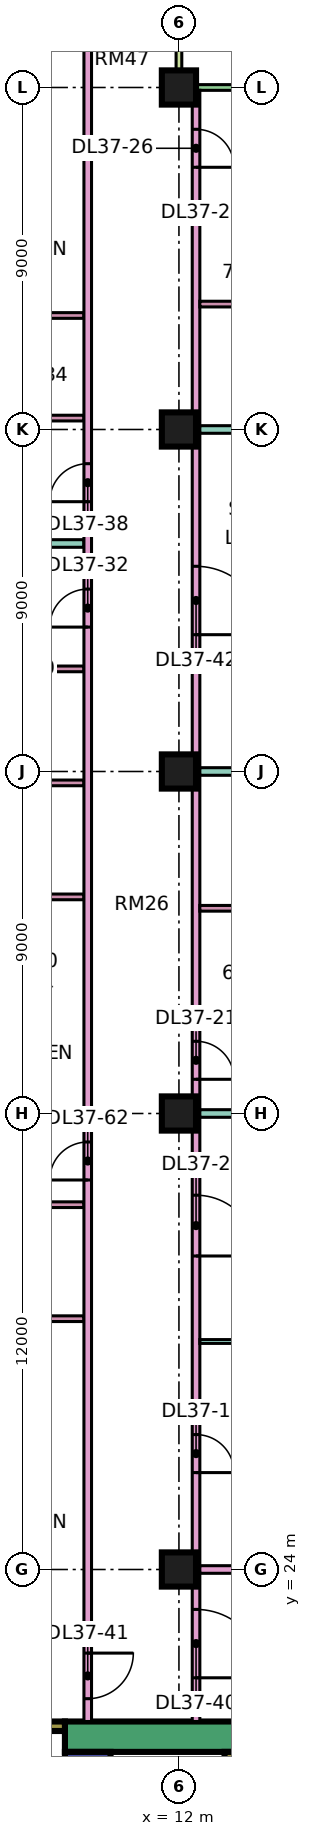
"""IFC4 building model, lengths in metres.
Left out: names, types, materials, properties, quantities, classifications, styles, units other than length and angle.
Written with IfcOpenShell. Run it as: python <this file> out.ifc"""

import sys

from ifc_helpers import new_model, si_unit, direction, frame, frame_2d, origin, origin_2d, place, context, subcontext, project, spatial, rectangle, extrude, element, fill, save


model = new_model("IFC4")
c1 = context("Model", 3, precision=1e-05, world=origin(), true_north=direction((0.0, 1.0)))
c2 = subcontext(c1, "Body", "Model", "MODEL_VIEW")
j1 = project(units=[si_unit("LENGTHUNIT", "METRE"), si_unit("PLANEANGLEUNIT", "RADIAN")], contexts=[c1])
p1 = place(None, origin())
s1 = spatial("IfcSite", under=j1, at=p1, CompositionType="ELEMENT")
p2 = place(p1, origin())
s2 = spatial("IfcBuilding", under=s1, at=p2, CompositionType="ELEMENT")
p3 = place(p2, frame((0.0, 0.0, 164.9)))
s3 = spatial("IfcBuildingStorey", under=s2, at=p3, CompositionType="ELEMENT", Elevation=164.9)
for number, where, z_axis, x_axis in (
    (1, (12.0, 24.0, 0.0), (0.0, 0.0, 1.0), (1.0, 0.0, 0.0)),
    (2, (12.0, 36.0, 0.0), (0.0, 0.0, 1.0), (1.0, 0.0, 0.0)),
    (3, (12.0, 45.0, 0.0), (0.0, 0.0, 1.0), (1.0, 0.0, 0.0)),
    (4, (12.0, 54.0, 0.0), (0.0, 0.0, 1.0), (1.0, 0.0, 0.0)),
    (5, (12.0, 63.0, 0.0), (0.0, 0.0, 1.0), (1.0, 0.0, 0.0)),
):
    element("IfcColumn", number, at=place(p3, frame(where, z_axis=z_axis, x_axis=x_axis)), inside=s3, PredefinedType="COLUMN", context=c2, shape_type="SweptSolid", body=[
        extrude(rectangle(XDim=0.9, YDim=0.9, at=origin_2d()), origin(), (0.0, 0.0, 1.0), 3.75),
    ])
p4 = place(p3, frame((9.0, 19.6, 0.0), z_axis=(0.0, 0.0, 1.0), x_axis=(1.0, 0.0, 0.0)))
e6 = element("IfcWall", 6, at=p4, inside=s3, PredefinedType="SHEAR", context=c2, shape_type="SweptSolid", body=[
    extrude(rectangle(XDim=25.0, YDim=0.8, at=frame_2d((12.5, 0.0))), origin(), (0.0, 0.0, 1.0), 3.75),
])
p5 = place(p4, frame((19.1, 0.0, 0.0)))
e7 = element("IfcOpeningElement", 7, at=p5, cuts=e6, PredefinedType="OPENING", context=c2, shape_type="SweptSolid", body=[
    extrude(rectangle(XDim=1.8, YDim=2.4, at=frame_2d((0.9, 1.2))), frame((0.0, 0.41, 0.0), z_axis=(0.0, -1.0, 0.0), x_axis=(1.0, 0.0, 0.0)), (0.0, 0.0, 1.0), 0.82),
])
p6 = place(p3, frame((9.6, 7.8, 0.0), z_axis=(0.0, 0.0, 1.0), x_axis=(0.0, 1.0, 0.0)))
e8 = element("IfcWall", 8, at=p6, inside=s3, PredefinedType="SHEAR", context=c2, shape_type="SweptSolid", body=[
    extrude(rectangle(XDim=11.4, YDim=1.2, at=frame_2d((5.7, 0.0))), origin(), (0.0, 0.0, 1.0), 3.75),
])
p7 = place(p6, frame((4.075, 0.0, 0.0)))
e9 = element("IfcOpeningElement", 9, at=p7, cuts=e8, PredefinedType="OPENING", context=c2, shape_type="SweptSolid", body=[
    extrude(rectangle(XDim=1.1, YDim=2.2, at=frame_2d((0.55, 1.1))), frame((0.0, 0.61, 0.0), z_axis=(0.0, -1.0, 0.0), x_axis=(1.0, 0.0, 0.0)), (0.0, 0.0, 1.0), 1.22),
])
p8 = place(p6, frame((6.575, 0.0, 0.0)))
e10 = element("IfcOpeningElement", 10, at=p8, cuts=e8, PredefinedType="OPENING", context=c2, shape_type="SweptSolid", body=[
    extrude(rectangle(XDim=1.1, YDim=2.2, at=frame_2d((0.55, 1.1))), frame((0.0, 0.61, 0.0), z_axis=(0.0, -1.0, 0.0), x_axis=(1.0, 0.0, 0.0)), (0.0, 0.0, 1.0), 1.22),
])
p9 = place(p6, frame((9.4, 0.0, 0.0)))
e11 = element("IfcOpeningElement", 11, at=p9, cuts=e8, PredefinedType="OPENING", context=c2, shape_type="SweptSolid", body=[
    extrude(rectangle(XDim=1.1, YDim=2.2, at=frame_2d((0.55, 1.1))), frame((0.0, 0.61, 0.0), z_axis=(0.0, -1.0, 0.0), x_axis=(1.0, 0.0, 0.0)), (0.0, 0.0, 1.0), 1.22),
])
p10 = place(p6, frame((1.75, 0.0, 0.0)))
e12 = element("IfcOpeningElement", 12, at=p10, cuts=e8, PredefinedType="OPENING", context=c2, shape_type="SweptSolid", body=[
    extrude(rectangle(XDim=0.9, YDim=2.1, at=frame_2d((0.45, 1.05))), frame((0.0, 0.61, 0.0), z_axis=(0.0, -1.0, 0.0), x_axis=(1.0, 0.0, 0.0)), (0.0, 0.0, 1.0), 1.22),
])
p11 = place(p3, frame((13.325, 7.8, 0.0), z_axis=(0.0, 0.0, 1.0), x_axis=(0.0, 1.0, 0.0)))
e13 = element("IfcWall", 13, at=p11, inside=s3, PredefinedType="SHEAR", context=c2, shape_type="SweptSolid", body=[
    extrude(rectangle(XDim=11.4, YDim=0.25, at=frame_2d((5.7, 0.0))), origin(), (0.0, 0.0, 1.0), 3.75),
])
p12 = place(p3, frame((2.1, 19.875, 0.0), z_axis=(0.0, 0.0, 1.0), x_axis=(1.0, 0.0, 0.0)))
e14 = element("IfcWall", 14, at=p12, inside=s3, PredefinedType="SHEAR", context=c2, shape_type="SweptSolid", body=[
    extrude(rectangle(XDim=6.9, YDim=0.25, at=frame_2d((3.45, 0.0))), origin(), (0.0, 0.0, 1.0), 3.75),
])
p13 = place(p12, frame((1.175, 0.0, 0.0)))
e15 = element("IfcOpeningElement", 15, at=p13, cuts=e14, PredefinedType="OPENING", context=c2, shape_type="SweptSolid", body=[
    extrude(rectangle(XDim=1.1, YDim=2.2, at=frame_2d((0.55, 1.1))), frame((0.0, 0.135, 0.0), z_axis=(0.0, -1.0, 0.0), x_axis=(1.0, 0.0, 0.0)), (0.0, 0.0, 1.0), 0.27),
])
p14 = place(p12, frame((4.6, 0.0, 0.0)))
e16 = element("IfcOpeningElement", 16, at=p14, cuts=e14, PredefinedType="OPENING", context=c2, shape_type="SweptSolid", body=[
    extrude(rectangle(XDim=1.2, YDim=2.2, at=frame_2d((0.6, 1.1))), frame((0.0, 0.135, 0.0), z_axis=(0.0, -1.0, 0.0), x_axis=(1.0, 0.0, 0.0)), (0.0, 0.0, 1.0), 0.27),
])
p15 = place(p3, frame((22.425, 63.0, 0.0), z_axis=(0.0, 0.0, 1.0), x_axis=(-1.0, 0.0, 0.0)))
e17 = element("IfcWall", 17, at=p15, inside=s3, PredefinedType="SOLIDWALL", context=c2, shape_type="SweptSolid", body=[
    extrude(rectangle(XDim=10.35, YDim=0.15, at=frame_2d((5.175, 0.0))), origin(), (0.0, 0.0, 1.0), 3.35),
])
p16 = place(p15, frame((1.087, 0.0, 0.0)))
e18 = element("IfcOpeningElement", 18, at=p16, cuts=e17, PredefinedType="OPENING", context=c2, shape_type="SweptSolid", body=[
    extrude(rectangle(XDim=1.8, YDim=2.4, at=frame_2d((0.9, 1.2))), frame((0.0, 0.085, 0.0), z_axis=(0.0, -1.0, 0.0), x_axis=(1.0, 0.0, 0.0)), (0.0, 0.0, 1.0), 0.17),
])
p17 = place(p15, frame((5.425, 0.0, 0.45)))
e19 = element("IfcOpeningElement", 19, at=p17, cuts=e17, PredefinedType="OPENING", context=c2, shape_type="SweptSolid", body=[
    extrude(rectangle(XDim=3.0, YDim=2.4, at=frame_2d((1.5, 1.2))), frame((0.0, 0.085, 0.0), z_axis=(0.0, -1.0, 0.0), x_axis=(1.0, 0.0, 0.0)), (0.0, 0.0, 1.0), 0.17),
])
p18 = place(p3, frame((12.0, 64.5, 0.0), z_axis=(0.0, 0.0, 1.0), x_axis=(0.0, -1.0, 0.0)))
e20 = element("IfcWall", 20, at=p18, inside=s3, PredefinedType="SOLIDWALL", context=c2, shape_type="SweptSolid", body=[
    extrude(rectangle(XDim=1.5, YDim=0.15, at=frame_2d((0.75, 0.0))), origin(), (0.0, 0.0, 1.0), 3.35),
])
p19 = place(p3, frame((0.0, 36.0, 0.0), z_axis=(0.0, 0.0, 1.0), x_axis=(1.0, 0.0, 0.0)))
e21 = element("IfcWall", 21, at=p19, inside=s3, PredefinedType="PARTITIONING", context=c2, shape_type="SweptSolid", body=[
    extrude(rectangle(XDim=9.5, YDim=0.2, at=frame_2d((4.75, 0.0))), origin(), (0.0, 0.0, 1.0), 3.35),
])
p20 = place(p3, frame((-1.35, 51.0, 0.0), z_axis=(0.0, 0.0, 1.0), x_axis=(1.0, 0.0, 0.0)))
e22 = element("IfcWall", 22, at=p20, inside=s3, PredefinedType="PARTITIONING", context=c2, shape_type="SweptSolid", body=[
    extrude(rectangle(XDim=10.85, YDim=0.2, at=frame_2d((5.425, 0.0))), origin(), (0.0, 0.0, 1.0), 3.35),
])
p21 = place(p3, frame((0.074, 22.4, 0.0), z_axis=(0.0, 0.0, 1.0), x_axis=(1.0, 0.0, 0.0)))
e23 = element("IfcWall", 23, at=p21, inside=s3, PredefinedType="PARTITIONING", context=c2, shape_type="SweptSolid", body=[
    extrude(rectangle(XDim=9.426, YDim=0.2, at=frame_2d((4.713, 0.0))), origin(), (0.0, 0.0, 1.0), 3.35),
])
for number, where, z_axis, x_axis in (
    (24, (6.375, 30.6, 0.0), (0.0, 0.0, 1.0), (1.0, 0.0, 0.0)),
    (25, (6.375, 33.6, 0.0), (0.0, 0.0, 1.0), (1.0, 0.0, 0.0)),
):
    element("IfcWall", number, at=place(p3, frame(where, z_axis=z_axis, x_axis=x_axis)), inside=s3, PredefinedType="PARTITIONING", context=c2, shape_type="SweptSolid", body=[
        extrude(rectangle(XDim=3.125, YDim=0.15, at=frame_2d((1.562, 0.0))), origin(), (0.0, 0.0, 1.0), 3.35),
    ])
p22 = place(p3, frame((6.375, 54.3, 0.0), z_axis=(0.0, 0.0, 1.0), x_axis=(1.0, 0.0, 0.0)))
e26 = element("IfcWall", 26, at=p22, inside=s3, PredefinedType="PARTITIONING", context=c2, shape_type="SweptSolid", body=[
    extrude(rectangle(XDim=3.125, YDim=0.15, at=frame_2d((1.562, 0.0))), origin(), (0.0, 0.0, 1.0), 3.35),
])
p23 = place(p22, frame((1.225, 0.0, 0.0)))
e27 = element("IfcOpeningElement", 27, at=p23, cuts=e26, PredefinedType="OPENING", context=c2, shape_type="SweptSolid", body=[
    extrude(rectangle(XDim=0.8, YDim=2.1, at=frame_2d((0.4, 1.05))), frame((0.0, 0.085, 0.0), z_axis=(0.0, -1.0, 0.0), x_axis=(1.0, 0.0, 0.0)), (0.0, 0.0, 1.0), 0.17),
])
p24 = place(p3, frame((6.375, 57.0, 0.0), z_axis=(0.0, 0.0, 1.0), x_axis=(1.0, 0.0, 0.0)))
e28 = element("IfcWall", 28, at=p24, inside=s3, PredefinedType="PARTITIONING", context=c2, shape_type="SweptSolid", body=[
    extrude(rectangle(XDim=3.125, YDim=0.15, at=frame_2d((1.562, 0.0))), origin(), (0.0, 0.0, 1.0), 3.35),
])
for number, where, z_axis, x_axis in (
    (29, (6.675, 41.7, 0.0), (0.0, 0.0, 1.0), (1.0, 0.0, 0.0)),
    (30, (6.675, 44.7, 0.0), (0.0, 0.0, 1.0), (1.0, 0.0, 0.0)),
    (31, (6.675, 47.7, 0.0), (0.0, 0.0, 1.0), (1.0, 0.0, 0.0)),
):
    element("IfcWall", number, at=place(p3, frame(where, z_axis=z_axis, x_axis=x_axis)), inside=s3, PredefinedType="PARTITIONING", context=c2, shape_type="SweptSolid", body=[
        extrude(rectangle(XDim=2.825, YDim=0.15, at=frame_2d((1.413, 0.0))), origin(), (0.0, 0.0, 1.0), 3.35),
    ])
p25 = place(p3, frame((9.6, 20.0, 0.0), z_axis=(0.0, 0.0, 1.0), x_axis=(0.0, 1.0, 0.0)))
e32 = element("IfcWall", 32, at=p25, inside=s3, PredefinedType="PARTITIONING", context=c2, shape_type="SweptSolid", body=[
    extrude(rectangle(XDim=44.35, YDim=0.2, at=frame_2d((22.175, 0.0))), origin(), (0.0, 0.0, 1.0), 3.35),
])
p26 = place(p25, frame((28.8, 0.0, 0.0)))
e33 = element("IfcOpeningElement", 33, at=p26, cuts=e32, PredefinedType="OPENING", context=c2, shape_type="SweptSolid", body=[
    extrude(rectangle(XDim=1.0, YDim=2.1, at=frame_2d((0.5, 1.05))), frame((0.0, 0.11, 0.0), z_axis=(0.0, -1.0, 0.0), x_axis=(1.0, 0.0, 0.0)), (0.0, 0.0, 1.0), 0.22),
])
p27 = place(p25, frame((32.1, 0.0, 0.0)))
e34 = element("IfcOpeningElement", 34, at=p27, cuts=e32, PredefinedType="OPENING", context=c2, shape_type="SweptSolid", body=[
    extrude(rectangle(XDim=1.0, YDim=2.1, at=frame_2d((0.5, 1.05))), frame((0.0, 0.11, 0.0), z_axis=(0.0, -1.0, 0.0), x_axis=(1.0, 0.0, 0.0)), (0.0, 0.0, 1.0), 0.22),
])
p28 = place(p25, frame((0.6, 0.0, 0.0)))
e35 = element("IfcOpeningElement", 35, at=p28, cuts=e32, PredefinedType="OPENING", context=c2, shape_type="SweptSolid", body=[
    extrude(rectangle(XDim=1.2, YDim=2.1, at=frame_2d((0.6, 1.05))), frame((0.0, 0.11, 0.0), z_axis=(0.0, -1.0, 0.0), x_axis=(1.0, 0.0, 0.0)), (0.0, 0.0, 1.0), 0.22),
])
p29 = place(p25, frame((14.25, 0.0, 0.0)))
e36 = element("IfcOpeningElement", 36, at=p29, cuts=e32, PredefinedType="OPENING", context=c2, shape_type="SweptSolid", body=[
    extrude(rectangle(XDim=1.0, YDim=2.1, at=frame_2d((0.5, 1.05))), frame((0.0, 0.11, 0.0), z_axis=(0.0, -1.0, 0.0), x_axis=(1.0, 0.0, 0.0)), (0.0, 0.0, 1.0), 0.22),
])
p30 = place(p3, frame((12.45, 20.0, 0.0), z_axis=(0.0, 0.0, 1.0), x_axis=(0.0, 1.0, 0.0)))
e37 = element("IfcWall", 37, at=p30, inside=s3, PredefinedType="PARTITIONING", context=c2, shape_type="SweptSolid", body=[
    extrude(rectangle(XDim=42.926, YDim=0.2, at=frame_2d((21.463, 0.0))), origin(), (0.0, 0.0, 1.0), 3.35),
])
p31 = place(p30, frame((6.55, 0.0, 0.0)))
e38 = element("IfcOpeningElement", 38, at=p31, cuts=e37, PredefinedType="OPENING", context=c2, shape_type="SweptSolid", body=[
    extrude(rectangle(XDim=1.0, YDim=2.1, at=frame_2d((0.5, 1.05))), frame((0.0, 0.11, 0.0), z_axis=(0.0, -1.0, 0.0), x_axis=(1.0, 0.0, 0.0)), (0.0, 0.0, 1.0), 0.22),
])
p32 = place(p30, frame((12.25, 0.0, 0.0)))
e39 = element("IfcOpeningElement", 39, at=p32, cuts=e37, PredefinedType="OPENING", context=c2, shape_type="SweptSolid", body=[
    extrude(rectangle(XDim=1.6, YDim=2.1, at=frame_2d((0.8, 1.05))), frame((0.0, 0.11, 0.0), z_axis=(0.0, -1.0, 0.0), x_axis=(1.0, 0.0, 0.0)), (0.0, 0.0, 1.0), 0.22),
])
p33 = place(p30, frame((16.9, 0.0, 0.0)))
e40 = element("IfcOpeningElement", 40, at=p33, cuts=e37, PredefinedType="OPENING", context=c2, shape_type="SweptSolid", body=[
    extrude(rectangle(XDim=1.0, YDim=2.1, at=frame_2d((0.5, 1.05))), frame((0.0, 0.11, 0.0), z_axis=(0.0, -1.0, 0.0), x_axis=(1.0, 0.0, 0.0)), (0.0, 0.0, 1.0), 0.22),
])
p34 = place(p30, frame((40.9, 0.0, 0.0)))
e41 = element("IfcOpeningElement", 41, at=p34, cuts=e37, PredefinedType="OPENING", context=c2, shape_type="SweptSolid", body=[
    extrude(rectangle(XDim=1.0, YDim=2.1, at=frame_2d((0.5, 1.05))), frame((0.0, 0.11, 0.0), z_axis=(0.0, -1.0, 0.0), x_axis=(1.0, 0.0, 0.0)), (0.0, 0.0, 1.0), 0.22),
])
p35 = place(p30, frame((1.15, 0.0, 0.0)))
e42 = element("IfcOpeningElement", 42, at=p35, cuts=e37, PredefinedType="OPENING", context=c2, shape_type="SweptSolid", body=[
    extrude(rectangle(XDim=1.8, YDim=2.1, at=frame_2d((0.9, 1.05))), frame((0.0, 0.11, 0.0), z_axis=(0.0, -1.0, 0.0), x_axis=(1.0, 0.0, 0.0)), (0.0, 0.0, 1.0), 0.22),
])
p36 = place(p30, frame((28.6, 0.0, 0.0)))
e43 = element("IfcOpeningElement", 43, at=p36, cuts=e37, PredefinedType="OPENING", context=c2, shape_type="SweptSolid", body=[
    extrude(rectangle(XDim=1.8, YDim=2.1, at=frame_2d((0.9, 1.05))), frame((0.0, 0.11, 0.0), z_axis=(0.0, -1.0, 0.0), x_axis=(1.0, 0.0, 0.0)), (0.0, 0.0, 1.0), 0.22),
])
p37 = place(p3, frame((12.55, 24.0, 0.0), z_axis=(0.0, 0.0, 1.0), x_axis=(1.0, 0.0, 0.0)))
e44 = element("IfcWall", 44, at=p37, inside=s3, PredefinedType="PARTITIONING", context=c2, shape_type="SweptSolid", body=[
    extrude(rectangle(XDim=8.95, YDim=0.2, at=frame_2d((4.475, 0.0))), origin(), (0.0, 0.0, 1.0), 3.35),
])
p38 = place(p3, frame((12.55, 30.0, 0.0), z_axis=(0.0, 0.0, 1.0), x_axis=(1.0, 0.0, 0.0)))
e45 = element("IfcWall", 45, at=p38, inside=s3, PredefinedType="PARTITIONING", context=c2, shape_type="SweptSolid", body=[
    extrude(rectangle(XDim=8.95, YDim=0.1, at=frame_2d((4.475, 0.0))), origin(), (0.0, 0.0, 1.0), 3.35),
])
p39 = place(p3, frame((12.55, 36.0, 0.0), z_axis=(0.0, 0.0, 1.0), x_axis=(1.0, 0.0, 0.0)))
e46 = element("IfcWall", 46, at=p39, inside=s3, PredefinedType="PARTITIONING", context=c2, shape_type="SweptSolid", body=[
    extrude(rectangle(XDim=11.45, YDim=0.2, at=frame_2d((5.725, 0.0))), origin(), (0.0, 0.0, 1.0), 3.35),
])
for number, where, z_axis, x_axis in (
    (47, (12.55, 38.7, 0.0), (0.0, 0.0, 1.0), (1.0, 0.0, 0.0)),
    (48, (12.55, 41.4, 0.0), (0.0, 0.0, 1.0), (1.0, 0.0, 0.0)),
):
    element("IfcWall", number, at=place(p3, frame(where, z_axis=z_axis, x_axis=x_axis)), inside=s3, PredefinedType="PARTITIONING", context=c2, shape_type="SweptSolid", body=[
        extrude(rectangle(XDim=4.625, YDim=0.15, at=frame_2d((2.312, 0.0))), origin(), (0.0, 0.0, 1.0), 3.35),
    ])
p40 = place(p3, frame((12.55, 45.0, 0.0), z_axis=(0.0, 0.0, 1.0), x_axis=(1.0, 0.0, 0.0)))
e49 = element("IfcWall", 49, at=p40, inside=s3, PredefinedType="PARTITIONING", context=c2, shape_type="SweptSolid", body=[
    extrude(rectangle(XDim=11.376, YDim=0.2, at=frame_2d((5.688, 0.0))), origin(), (0.0, 0.0, 1.0), 3.35),
])
p41 = place(p3, frame((12.55, 54.0, 0.0), z_axis=(0.0, 0.0, 1.0), x_axis=(1.0, 0.0, 0.0)))
e50 = element("IfcWall", 50, at=p41, inside=s3, PredefinedType="PARTITIONING", context=c2, shape_type="SweptSolid", body=[
    extrude(rectangle(XDim=11.45, YDim=0.2, at=frame_2d((5.725, 0.0))), origin(), (0.0, 0.0, 1.0), 3.35),
])
p42 = place(p3, frame((12.55, 57.3, 0.0), z_axis=(0.0, 0.0, 1.0), x_axis=(1.0, 0.0, 0.0)))
e51 = element("IfcWall", 51, at=p42, inside=s3, PredefinedType="PARTITIONING", context=c2, shape_type="SweptSolid", body=[
    extrude(rectangle(XDim=4.625, YDim=0.15, at=frame_2d((2.312, 0.0))), origin(), (0.0, 0.0, 1.0), 3.35),
])
p43 = place(p3, frame((12.55, 59.7, 0.0), z_axis=(0.0, 0.0, 1.0), x_axis=(1.0, 0.0, 0.0)))
e52 = element("IfcWall", 52, at=p43, inside=s3, PredefinedType="PARTITIONING", context=c2, shape_type="SweptSolid", body=[
    extrude(rectangle(XDim=4.625, YDim=0.15, at=frame_2d((2.312, 0.0))), origin(), (0.0, 0.0, 1.0), 3.35),
])
p44 = place(p43, frame((1.85, 0.0, 0.0)))
e53 = element("IfcOpeningElement", 53, at=p44, cuts=e52, PredefinedType="OPENING", context=c2, shape_type="SweptSolid", body=[
    extrude(rectangle(XDim=0.8, YDim=2.1, at=frame_2d((0.4, 1.05))), frame((0.0, 0.085, 0.0), z_axis=(0.0, -1.0, 0.0), x_axis=(1.0, 0.0, 0.0)), (0.0, 0.0, 1.0), 0.17),
])
p45 = place(p31, frame((1.0, 0.0, 0.0), z_axis=(0.0, 0.0, 1.0), x_axis=(-1.0, 0.0, 0.0)))
e54 = element("IfcDoor", 54, at=p45, inside=s3, OperationType="SINGLE_SWING_LEFT", PredefinedType="DOOR", context=c2, shape_type="SweptSolid", body=[
    extrude(rectangle(XDim=1.0, YDim=2.1, at=frame_2d((0.5, 1.05))), frame((0.0, 0.025, 0.0), z_axis=(0.0, -1.0, 0.0), x_axis=(1.0, 0.0, 0.0)), (0.0, 0.0, 1.0), 0.05),
])
fill(e38, e54)
p46 = place(p32, frame((1.6, 0.0, 0.0), z_axis=(0.0, 0.0, 1.0), x_axis=(-1.0, 0.0, 0.0)))
e55 = element("IfcDoor", 55, at=p46, inside=s3, OperationType="DOUBLE_DOOR_SINGLE_SWING", PredefinedType="DOOR", context=c2, shape_type="SweptSolid", body=[
    extrude(rectangle(XDim=1.6, YDim=2.1, at=frame_2d((0.8, 1.05))), frame((0.0, 0.025, 0.0), z_axis=(0.0, -1.0, 0.0), x_axis=(1.0, 0.0, 0.0)), (0.0, 0.0, 1.0), 0.05),
])
fill(e39, e55)
p47 = place(p33, frame((1.0, 0.0, 0.0), z_axis=(0.0, 0.0, 1.0), x_axis=(-1.0, 0.0, 0.0)))
e56 = element("IfcDoor", 56, at=p47, inside=s3, OperationType="SINGLE_SWING_LEFT", PredefinedType="DOOR", context=c2, shape_type="SweptSolid", body=[
    extrude(rectangle(XDim=1.0, YDim=2.1, at=frame_2d((0.5, 1.05))), frame((0.0, 0.025, 0.0), z_axis=(0.0, -1.0, 0.0), x_axis=(1.0, 0.0, 0.0)), (0.0, 0.0, 1.0), 0.05),
])
fill(e40, e56)
p48 = place(p34, frame((1.0, 0.0, 0.0), z_axis=(0.0, 0.0, 1.0), x_axis=(-1.0, 0.0, 0.0)))
e57 = element("IfcDoor", 57, at=p48, inside=s3, OperationType="SINGLE_SWING_LEFT", PredefinedType="DOOR", context=c2, shape_type="SweptSolid", body=[
    extrude(rectangle(XDim=1.0, YDim=2.1, at=frame_2d((0.5, 1.05))), frame((0.0, 0.025, 0.0), z_axis=(0.0, -1.0, 0.0), x_axis=(1.0, 0.0, 0.0)), (0.0, 0.0, 1.0), 0.05),
])
fill(e41, e57)
p49 = place(p26, origin())
e58 = element("IfcDoor", 58, at=p49, inside=s3, OperationType="SINGLE_SWING_LEFT", PredefinedType="DOOR", context=c2, shape_type="SweptSolid", body=[
    extrude(rectangle(XDim=1.0, YDim=2.1, at=frame_2d((0.5, 1.05))), frame((0.0, 0.025, 0.0), z_axis=(0.0, -1.0, 0.0), x_axis=(1.0, 0.0, 0.0)), (0.0, 0.0, 1.0), 0.05),
])
fill(e33, e58)
p50 = place(p27, origin())
e59 = element("IfcDoor", 59, at=p50, inside=s3, OperationType="SINGLE_SWING_LEFT", PredefinedType="DOOR", context=c2, shape_type="SweptSolid", body=[
    extrude(rectangle(XDim=1.0, YDim=2.1, at=frame_2d((0.5, 1.05))), frame((0.0, 0.025, 0.0), z_axis=(0.0, -1.0, 0.0), x_axis=(1.0, 0.0, 0.0)), (0.0, 0.0, 1.0), 0.05),
])
fill(e34, e59)
p51 = place(p35, frame((1.8, 0.0, 0.0), z_axis=(0.0, 0.0, 1.0), x_axis=(-1.0, 0.0, 0.0)))
e60 = element("IfcDoor", 60, at=p51, inside=s3, OperationType="DOUBLE_DOOR_SINGLE_SWING", PredefinedType="DOOR", context=c2, shape_type="SweptSolid", body=[
    extrude(rectangle(XDim=1.8, YDim=2.1, at=frame_2d((0.9, 1.05))), frame((0.0, 0.025, 0.0), z_axis=(0.0, -1.0, 0.0), x_axis=(1.0, 0.0, 0.0)), (0.0, 0.0, 1.0), 0.05),
])
fill(e42, e60)
p52 = place(p28, origin())
e61 = element("IfcDoor", 61, at=p52, inside=s3, OperationType="SINGLE_SWING_RIGHT", PredefinedType="DOOR", context=c2, shape_type="SweptSolid", body=[
    extrude(rectangle(XDim=1.2, YDim=2.1, at=frame_2d((0.6, 1.05))), frame((0.0, 0.025, 0.0), z_axis=(0.0, -1.0, 0.0), x_axis=(1.0, 0.0, 0.0)), (0.0, 0.0, 1.0), 0.05),
])
fill(e35, e61)
p53 = place(p36, frame((1.8, 0.0, 0.0), z_axis=(0.0, 0.0, 1.0), x_axis=(-1.0, 0.0, 0.0)))
e62 = element("IfcDoor", 62, at=p53, inside=s3, OperationType="DOUBLE_DOOR_SINGLE_SWING", PredefinedType="DOOR", context=c2, shape_type="SweptSolid", body=[
    extrude(rectangle(XDim=1.8, YDim=2.1, at=frame_2d((0.9, 1.05))), frame((0.0, 0.025, 0.0), z_axis=(0.0, -1.0, 0.0), x_axis=(1.0, 0.0, 0.0)), (0.0, 0.0, 1.0), 0.05),
])
fill(e43, e62)
p54 = place(p29, origin())
e63 = element("IfcDoor", 63, at=p54, inside=s3, OperationType="SINGLE_SWING_LEFT", PredefinedType="DOOR", context=c2, shape_type="SweptSolid", body=[
    extrude(rectangle(XDim=1.0, YDim=2.1, at=frame_2d((0.5, 1.05))), frame((0.0, 0.025, 0.0), z_axis=(0.0, -1.0, 0.0), x_axis=(1.0, 0.0, 0.0)), (0.0, 0.0, 1.0), 0.05),
])
fill(e36, e63)
save(model, sys.argv[1])
